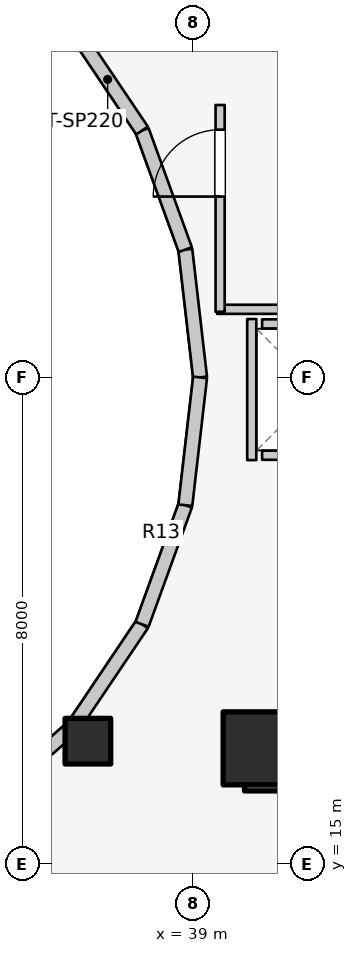
"""IFC4 building model, lengths in metres.
Left out: names, types, materials, properties, quantities, classifications, styles, units other than length and angle.
Written with IfcOpenShell. Run it as: python <this file> out.ifc"""

import sys

from ifc_helpers import new_model, si_unit, direction, frame, frame_2d, origin, origin_2d, place, context, subcontext, project, spatial, rectangle, extrude, element, fill, save


model = new_model("IFC4")
c1 = context("Model", 3, precision=1e-05, world=origin(), true_north=direction((0.0, 1.0)))
c2 = subcontext(c1, "Body", "Model", "MODEL_VIEW")
j1 = project(units=[si_unit("LENGTHUNIT", "METRE"), si_unit("PLANEANGLEUNIT", "RADIAN")], contexts=[c1])
p1 = place(None, origin())
s1 = spatial("IfcSite", under=j1, at=p1, CompositionType="ELEMENT")
p2 = place(p1, origin())
s2 = spatial("IfcBuilding", under=s1, at=p2, CompositionType="ELEMENT")
p3 = place(p2, frame((0.0, 0.0, 140.5)))
s3 = spatial("IfcBuildingStorey", under=s2, at=p3, CompositionType="ELEMENT", Elevation=140.5)
p4 = place(p3, frame((39.85, 16.55, 0.0), z_axis=(0.0, 0.0, 1.0), x_axis=(1.0, 0.0, 0.0)))
e1 = element("IfcWall", 1, at=p4, inside=s3, PredefinedType="SHEAR", context=c2, shape_type="SweptSolid", body=[
    extrude(rectangle(XDim=4.5, YDim=0.7, at=frame_2d((2.25, 0.0))), origin(), (0.0, 0.0, 1.0), 3.1),
])
p5 = place(p3, frame((40.1, 16.9, 0.0), z_axis=(0.0, 0.0, 1.0), x_axis=(1.0, 0.0, 0.0)))
e2 = element("IfcColumn", 2, at=p5, inside=s3, PredefinedType="COLUMN", context=c2, shape_type="SweptSolid", body=[
    extrude(rectangle(XDim=1.2, YDim=1.2, at=origin_2d()), origin(), (0.0, 0.0, 1.0), 3.1),
])
p6 = place(p3, frame((37.275, 17.018, 0.0), z_axis=(0.0, 0.0, 1.0), x_axis=(1.0, 0.0, 0.0)))
e3 = element("IfcColumn", 3, at=p6, inside=s3, PredefinedType="COLUMN", context=c2, shape_type="SweptSolid", body=[
    extrude(rectangle(XDim=0.75, YDim=0.75, at=origin_2d()), origin(), (0.0, 0.0, 1.0), 3.1),
])
p7 = place(p3, frame((39.12, 23.0, 0.0), z_axis=(0.0, 0.0, 1.0), x_axis=(-0.114711713601, 0.993398823617, 0.0)))
e4 = element("IfcWall", 4, at=p7, inside=s3, PredefinedType="STANDARD", context=c2, shape_type="SweptSolid", body=[
    extrude(rectangle(XDim=2.115, YDim=0.23, at=frame_2d((1.058, 0.0))), origin(), (0.0, 0.0, 1.0), 2.56),
])
p8 = place(p3, frame((38.877, 25.102, 0.0), z_axis=(0.0, 0.0, 1.0), x_axis=(-0.341423187295, 0.93990968033, 0.0)))
e5 = element("IfcWall", 5, at=p8, inside=s3, PredefinedType="STANDARD", context=c2, shape_type="SweptSolid", body=[
    extrude(rectangle(XDim=2.084, YDim=0.23, at=frame_2d((1.042, 0.0))), origin(), (0.0, 0.0, 1.0), 2.56),
])
p9 = place(p3, frame((38.166, 27.06, 0.0), z_axis=(0.0, 0.0, 1.0), x_axis=(-0.558197800898, 0.829707909492, 0.0)))
e6 = element("IfcWall", 6, at=p9, inside=s3, PredefinedType="STANDARD", context=c2, shape_type="SweptSolid", body=[
    extrude(rectangle(XDim=2.027, YDim=0.23, at=frame_2d((1.013, 0.0))), origin(), (0.0, 0.0, 1.0), 1.22),
])
p10 = place(p3, frame((35.56, 15.968, 0.0), z_axis=(0.0, 0.0, 1.0), x_axis=(0.752576694707, 0.658504607869, 0.0)))
e7 = element("IfcWall", 7, at=p10, inside=s3, PredefinedType="STANDARD", context=c2, shape_type="SweptSolid", body=[
    extrude(rectangle(XDim=1.959, YDim=0.23, at=frame_2d((0.98, 0.0))), origin(), (0.0, 0.0, 1.0), 1.22),
])
p11 = place(p3, frame((37.035, 17.258, 0.0), z_axis=(0.0, 0.0, 1.0), x_axis=(0.558197800898, 0.829707909492, 0.0)))
e8 = element("IfcWall", 8, at=p11, inside=s3, PredefinedType="STANDARD", context=c2, shape_type="SweptSolid", body=[
    extrude(rectangle(XDim=2.027, YDim=0.23, at=frame_2d((1.013, 0.0))), origin(), (0.0, 0.0, 1.0), 1.22),
])
p12 = place(p3, frame((38.166, 18.94, 0.0), z_axis=(0.0, 0.0, 1.0), x_axis=(0.341423187295, 0.93990968033, 0.0)))
e9 = element("IfcWall", 9, at=p12, inside=s3, PredefinedType="STANDARD", context=c2, shape_type="SweptSolid", body=[
    extrude(rectangle(XDim=2.084, YDim=0.23, at=frame_2d((1.042, 0.0))), origin(), (0.0, 0.0, 1.0), 2.56),
])
p13 = place(p3, frame((38.877, 20.898, 0.0), z_axis=(0.0, 0.0, 1.0), x_axis=(0.114711713601, 0.993398823617, 0.0)))
e10 = element("IfcWall", 10, at=p13, inside=s3, PredefinedType="STANDARD", context=c2, shape_type="SweptSolid", body=[
    extrude(rectangle(XDim=2.115, YDim=0.23, at=frame_2d((1.058, 0.0))), origin(), (0.0, 0.0, 1.0), 2.56),
])
for number, where, z_axis, x_axis in (
    (11, (40.14, 21.72, 0.0), (0.0, 0.0, 1.0), (1.0, 0.0, 0.0)),
    (12, (40.14, 23.88, 0.0), (0.0, 0.0, 1.0), (1.0, 0.0, 0.0)),
):
    element("IfcWall", number, at=place(p3, frame(where, z_axis=z_axis, x_axis=x_axis)), inside=s3, PredefinedType="SOLIDWALL", context=c2, shape_type="SweptSolid", body=[
        extrude(rectangle(XDim=1.82, YDim=0.15, at=frame_2d((0.91, 0.0))), origin(), (0.0, 0.0, 1.0), 2.12),
    ])
p14 = place(p3, frame((39.97, 21.64, 0.0), z_axis=(0.0, 0.0, 1.0), x_axis=(0.0, 1.0, 0.0)))
e13 = element("IfcWall", 13, at=p14, inside=s3, PredefinedType="SOLIDWALL", context=c2, shape_type="SweptSolid", body=[
    extrude(rectangle(XDim=2.32, YDim=0.15, at=frame_2d((1.16, 0.0))), origin(), (0.0, 0.0, 1.0), 2.12),
])
p15 = place(p3, frame((39.4, 24.12, 0.0), z_axis=(0.0, 0.0, 1.0), x_axis=(1.0, 0.0, 0.0)))
e14 = element("IfcWall", 14, at=p15, inside=s3, PredefinedType="PARTITIONING", context=c2, shape_type="SweptSolid", body=[
    extrude(rectangle(XDim=5.08, YDim=0.15, at=frame_2d((2.54, 0.0))), origin(), (0.0, 0.0, 1.0), 2.12),
])
p16 = place(p3, frame((39.45, 24.08, 0.0), z_axis=(0.0, 0.0, 1.0), x_axis=(0.0, 1.0, 0.0)))
e15 = element("IfcWall", 15, at=p16, inside=s3, PredefinedType="PARTITIONING", context=c2, shape_type="SweptSolid", body=[
    extrude(rectangle(XDim=3.4, YDim=0.15, at=frame_2d((1.7, 0.0))), origin(), (0.0, 0.0, 1.0), 2.575),
])
p17 = place(p16, frame((1.894, 0.0, 0.0)))
e16 = element("IfcOpeningElement", 16, at=p17, cuts=e15, PredefinedType="OPENING", context=c2, shape_type="SweptSolid", body=[
    extrude(rectangle(XDim=1.1, YDim=2.1, at=frame_2d((0.55, 1.05))), frame((0.0, 0.085, 0.0), z_axis=(0.0, -1.0, 0.0), x_axis=(1.0, 0.0, 0.0)), (0.0, 0.0, 1.0), 0.17),
])
p18 = place(p3, frame((35.55, 15.985, 0.0), z_axis=(0.0, 0.0, 1.0), x_axis=(0.524565340045, -0.851370192116, 0.0)))
e17 = element("IfcWall", 17, at=p18, inside=s3, PredefinedType="PARTITIONING", context=c2, shape_type="SweptSolid", body=[
    extrude(rectangle(XDim=3.027, YDim=0.125, at=frame_2d((1.514, 0.0))), origin(), (0.0, 0.0, 1.0), 2.019),
])
p19 = place(p17, origin())
e18 = element("IfcDoor", 18, at=p19, inside=s3, OperationType="SINGLE_SWING_LEFT", PredefinedType="DOOR", context=c2, shape_type="SweptSolid", body=[
    extrude(rectangle(XDim=1.1, YDim=2.1, at=frame_2d((0.55, 1.05))), frame((0.0, 0.025, 0.0), z_axis=(0.0, -1.0, 0.0), x_axis=(1.0, 0.0, 0.0)), (0.0, 0.0, 1.0), 0.05),
])
fill(e16, e18)
save(model, sys.argv[1])
